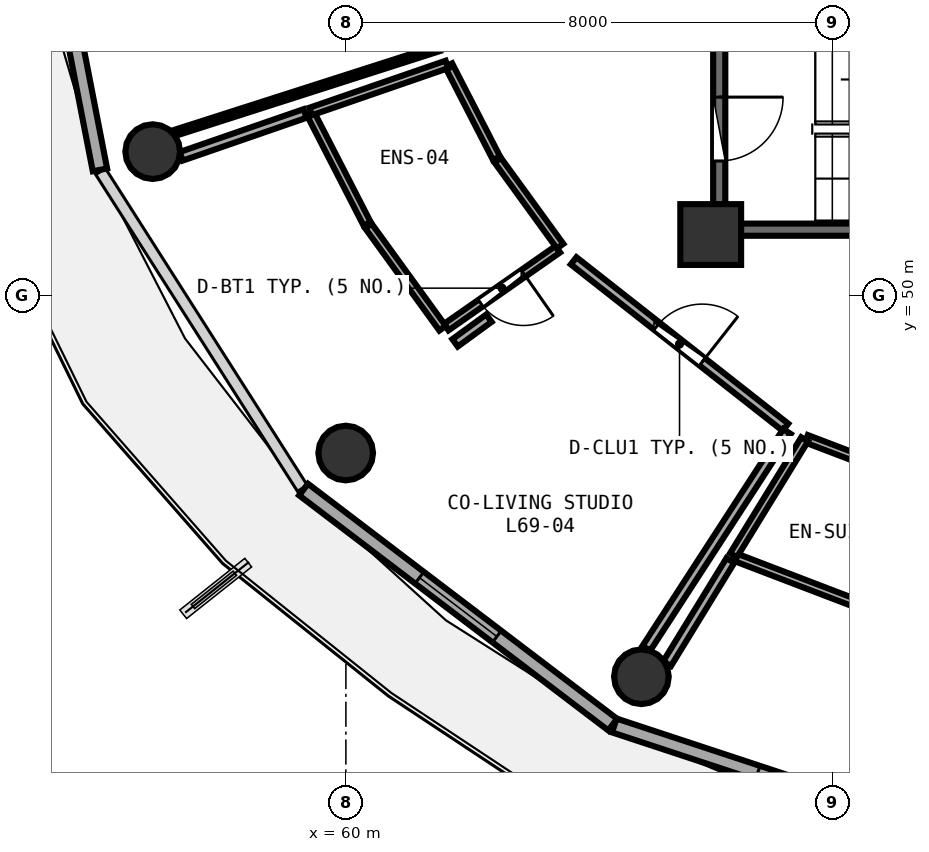
"""IFC4 building model, lengths in metres.
Left out: names, types, materials, properties, quantities, classifications, styles, units other than length and angle.
Written with IfcOpenShell. Run it as: python <this file> out.ifc"""

import sys

from ifc_helpers import new_model, si_unit, direction, frame, frame_2d, origin, origin_2d, place, context, subcontext, project, spatial, rectangle, circle, extrude, element, fill, save


model = new_model("IFC4")
c1 = context("Model", 3, precision=1e-05, world=origin(), true_north=direction((0.0, 1.0)))
c2 = subcontext(c1, "Body", "Model", "MODEL_VIEW")
j1 = project(units=[si_unit("LENGTHUNIT", "METRE"), si_unit("PLANEANGLEUNIT", "RADIAN")], contexts=[c1])
p1 = place(None, origin())
s1 = spatial("IfcSite", under=j1, at=p1, CompositionType="ELEMENT")
p2 = place(p1, origin())
s2 = spatial("IfcBuilding", under=s1, at=p2, CompositionType="ELEMENT")
p3 = place(p2, frame((0.0, 0.0, 271.2)))
s3 = spatial("IfcBuildingStorey", under=s2, at=p3, CompositionType="ELEMENT", Elevation=271.2)
p4 = place(p3, frame((66.0, 51.0, 0.0), z_axis=(0.0, 0.0, 1.0), x_axis=(1.0, 0.0, 0.0)))
e1 = element("IfcColumn", 1, at=p4, inside=s3, PredefinedType="PILASTER", context=c2, shape_type="SweptSolid", body=[
    extrude(rectangle(XDim=1.0, YDim=1.0, at=origin_2d()), origin(), (0.0, 0.0, 1.0), 3.75),
])
for number, where, z_axis, x_axis in (
    (2, (56.823, 52.364, 0.0), (0.0, 0.0, 1.0), (1.0, 0.0, 0.0)),
    (3, (59.997, 47.407, 0.0), (0.0, 0.0, 1.0), (1.0, 0.0, 0.0)),
    (4, (64.86, 43.728, 0.0), (0.0, 0.0, 1.0), (1.0, 0.0, 0.0)),
):
    element("IfcColumn", number, at=place(p3, frame(where, z_axis=z_axis, x_axis=x_axis)), inside=s3, PredefinedType="COLUMN", context=c2, shape_type="SweptSolid", body=[
        extrude(circle(Radius=0.45, at=origin_2d()), origin(), (0.0, 0.0, 1.0), 3.75),
    ])
p5 = place(p3, frame((54.803, 57.985, 0.0), z_axis=(0.0, 0.0, 1.0), x_axis=(0.190969309115, -0.981596008028, 0.0)))
e5 = element("IfcWall", 5, at=p5, inside=s3, PredefinedType="SOLIDWALL", context=c2, shape_type="SweptSolid", body=[
    extrude(rectangle(XDim=6.033, YDim=0.24, at=frame_2d((3.017, 0.0))), origin(), (0.0, 0.0, 1.0), 3.475),
])
p6 = place(p5, frame((2.216, 0.0, 0.85)))
e6 = element("IfcOpeningElement", 6, at=p6, cuts=e5, PredefinedType="OPENING", context=c2, shape_type="SweptSolid", body=[
    extrude(rectangle(XDim=1.6, YDim=1.45, at=frame_2d((0.8, 0.725))), frame((0.0, 0.13, 0.0), z_axis=(0.0, -1.0, 0.0), x_axis=(1.0, 0.0, 0.0)), (0.0, 0.0, 1.0), 0.26),
])
p7 = place(p3, frame((59.304, 46.806, 0.0), z_axis=(0.0, 0.0, 1.0), x_axis=(0.796010444211, -0.605282886514, 0.0)))
e7 = element("IfcWall", 7, at=p7, inside=s3, PredefinedType="SOLIDWALL", context=c2, shape_type="SweptSolid", body=[
    extrude(rectangle(XDim=6.387, YDim=0.24, at=frame_2d((3.194, 0.0))), origin(), (0.0, 0.0, 1.0), 3.475),
])
p8 = place(p7, frame((2.394, 0.0, 0.85)))
e8 = element("IfcOpeningElement", 8, at=p8, cuts=e7, PredefinedType="OPENING", context=c2, shape_type="SweptSolid", body=[
    extrude(rectangle(XDim=1.6, YDim=1.45, at=frame_2d((0.8, 0.725))), frame((0.0, 0.13, 0.0), z_axis=(0.0, -1.0, 0.0), x_axis=(1.0, 0.0, 0.0)), (0.0, 0.0, 1.0), 0.26),
])
p9 = place(p3, frame((64.414, 42.927, 0.0), z_axis=(0.0, 0.0, 1.0), x_axis=(0.949663708393, -0.313271193954, 0.0)))
e9 = element("IfcWall", 9, at=p9, inside=s3, PredefinedType="SOLIDWALL", context=c2, shape_type="SweptSolid", body=[
    extrude(rectangle(XDim=6.568, YDim=0.24, at=frame_2d((3.284, 0.0))), origin(), (0.0, 0.0, 1.0), 3.475),
])
p10 = place(p9, frame((2.484, 0.0, 0.85)))
e10 = element("IfcOpeningElement", 10, at=p10, cuts=e9, PredefinedType="OPENING", context=c2, shape_type="SweptSolid", body=[
    extrude(rectangle(XDim=1.6, YDim=1.45, at=frame_2d((0.8, 0.725))), frame((0.0, 0.13, 0.0), z_axis=(0.0, -1.0, 0.0), x_axis=(1.0, 0.0, 0.0)), (0.0, 0.0, 1.0), 0.26),
])
p11 = place(p3, frame((66.26, 51.08, 0.0), z_axis=(0.0, 0.0, 1.0), x_axis=(1.0, 0.0, 0.0)))
e11 = element("IfcWall", 11, at=p11, inside=s3, PredefinedType="SHEAR", context=c2, shape_type="SweptSolid", body=[
    extrude(rectangle(XDim=7.16, YDim=0.2, at=frame_2d((3.58, 0.0))), origin(), (0.0, 0.0, 1.0), 3.49),
])
p12 = place(p3, frame((66.14, 54.27, 0.0), z_axis=(0.0, 0.0, 1.0), x_axis=(0.0, -1.0, 0.0)))
e12 = element("IfcWall", 12, at=p12, inside=s3, PredefinedType="SHEAR", context=c2, shape_type="SweptSolid", body=[
    extrude(rectangle(XDim=3.07, YDim=0.2, at=frame_2d((1.535, 0.0))), origin(), (0.0, 0.0, 1.0), 3.49),
])
p13 = place(p12, frame((1.01, 0.0, 0.0)))
e13 = element("IfcOpeningElement", 13, at=p13, cuts=e12, PredefinedType="OPENING", context=c2, shape_type="SweptSolid", body=[
    extrude(rectangle(XDim=1.05, YDim=2.1, at=frame_2d((0.525, 1.05))), frame((0.0, 0.11, 0.0), z_axis=(0.0, -1.0, 0.0), x_axis=(1.0, 0.0, 0.0)), (0.0, 0.0, 1.0), 0.22),
])
p14 = place(p3, frame((63.486, 50.759, 0.0), z_axis=(0.0, 0.0, 1.0), x_axis=(-0.819963878171, -0.572415267525, 0.0)))
e14 = element("IfcWall", 14, at=p14, inside=s3, PredefinedType="PLUMBINGWALL", context=c2, shape_type="SweptSolid", body=[
    extrude(rectangle(XDim=2.239, YDim=0.13, at=frame_2d((1.119, 0.0))), origin(), (0.0, 0.0, 1.0), 3.175),
])
p15 = place(p14, frame((0.689, 0.0, 0.0)))
e15 = element("IfcOpeningElement", 15, at=p15, cuts=e14, PredefinedType="OPENING", context=c2, shape_type="SweptSolid", body=[
    extrude(rectangle(XDim=0.86, YDim=2.05, at=frame_2d((0.43, 1.025))), frame((0.0, 0.075, 0.0), z_axis=(0.0, -1.0, 0.0), x_axis=(1.0, 0.0, 0.0)), (0.0, 0.0, 1.0), 0.15),
])
p16 = place(p3, frame((63.745, 50.568, 0.0), z_axis=(0.0, 0.0, 1.0), x_axis=(0.786354671358, -0.617775307724, 0.0)))
e16 = element("IfcWall", 16, at=p16, inside=s3, PredefinedType="PARTITIONING", context=c2, shape_type="SweptSolid", body=[
    extrude(rectangle(XDim=4.43, YDim=0.15, at=frame_2d((2.215, 0.0))), origin(), (0.0, 0.0, 1.0), 3.075),
])
p17 = place(p16, frame((1.74, 0.0, 0.0)))
e17 = element("IfcOpeningElement", 17, at=p17, cuts=e16, PredefinedType="OPENING", context=c2, shape_type="SweptSolid", body=[
    extrude(rectangle(XDim=0.95, YDim=2.08, at=frame_2d((0.475, 1.04))), frame((0.0, 0.085, 0.0), z_axis=(0.0, -1.0, 0.0), x_axis=(1.0, 0.0, 0.0)), (0.0, 0.0, 1.0), 0.17),
])
p18 = place(p3, frame((61.532, 54.065, 0.0), z_axis=(0.0, 0.0, 1.0), x_axis=(-0.95227750557, -0.305233602976, 0.0)))
e18 = element("IfcWall", 18, at=p18, inside=s3, PredefinedType="PARTITIONING", context=c2, shape_type="SweptSolid", body=[
    extrude(rectangle(XDim=4.565, YDim=0.1, at=frame_2d((2.283, 0.0))), origin(), (0.0, 0.0, 1.0), 3.175),
])
p19 = place(p3, frame((61.689, 53.786, 0.0), z_axis=(0.0, 0.0, 1.0), x_axis=(0.457623641393, -0.889145996357, 0.0)))
e19 = element("IfcWall", 19, at=p19, inside=s3, PredefinedType="PLUMBINGWALL", context=c2, shape_type="SweptSolid", body=[
    extrude(rectangle(XDim=1.721, YDim=0.13, at=frame_2d((0.86, 0.0))), origin(), (0.0, 0.0, 1.0), 3.235),
])
p20 = place(p3, frame((62.498, 52.222, 0.0), z_axis=(0.0, 0.0, 1.0), x_axis=(0.587439614451, -0.809268002193, 0.0)))
e20 = element("IfcWall", 20, at=p20, inside=s3, PredefinedType="PLUMBINGWALL", context=c2, shape_type="SweptSolid", body=[
    extrude(rectangle(XDim=1.746, YDim=0.13, at=frame_2d((0.873, 0.0))), origin(), (0.0, 0.0, 1.0), 3.075),
])
p21 = place(p3, frame((61.589, 49.459, 0.0), z_axis=(0.0, 0.0, 1.0), x_axis=(-0.586913668513, 0.809649520294, 0.0)))
e21 = element("IfcWall", 21, at=p21, inside=s3, PredefinedType="PLUMBINGWALL", context=c2, shape_type="SweptSolid", body=[
    extrude(rectangle(XDim=2.078, YDim=0.13, at=frame_2d((1.039, 0.0))), origin(), (0.0, 0.0, 1.0), 3.48),
])
p22 = place(p3, frame((60.349, 51.176, 0.0), z_axis=(0.0, 0.0, 1.0), x_axis=(-0.456758857188, 0.889590549849, 0.0)))
e22 = element("IfcWall", 22, at=p22, inside=s3, PredefinedType="PLUMBINGWALL", context=c2, shape_type="SweptSolid", body=[
    extrude(rectangle(XDim=2.051, YDim=0.13, at=frame_2d((1.025, 0.0))), origin(), (0.0, 0.0, 1.0), 3.075),
])
p23 = place(p3, frame((59.422, 53.024, 0.0), z_axis=(0.0, 0.0, 1.0), x_axis=(0.945238193125, 0.326381308071, 0.0)))
e23 = element("IfcWall", 23, at=p23, inside=s3, PredefinedType="PLUMBINGWALL", context=c2, shape_type="SweptSolid", body=[
    extrude(rectangle(XDim=2.369, YDim=0.13, at=frame_2d((1.185, 0.0))), origin(), (0.0, 0.0, 1.0), 3.175),
])
p24 = place(p3, frame((67.254, 47.76, 0.0), z_axis=(0.0, 0.0, 1.0), x_axis=(-0.544234825024, -0.838932926539, 0.0)))
e24 = element("IfcWall", 24, at=p24, inside=s3, PredefinedType="PARTITIONING", context=c2, shape_type="SweptSolid", body=[
    extrude(rectangle(XDim=4.249, YDim=0.15, at=frame_2d((2.125, 0.0))), origin(), (0.0, 0.0, 1.0), 3.075),
])
p25 = place(p3, frame((57.291, 52.287, 0.0), z_axis=(0.0, 0.0, 1.0), x_axis=(0.945101825102, 0.326775978598, 0.0)))
e25 = element("IfcWall", 25, at=p25, inside=s3, PredefinedType="PARTITIONING", context=c2, shape_type="SweptSolid", body=[
    extrude(rectangle(XDim=2.156, YDim=0.15, at=frame_2d((1.078, 0.0))), origin(), (0.0, 0.0, 1.0), 3.075),
])
p26 = place(p3, frame((61.795, 49.219, 0.0), z_axis=(0.0, 0.0, 1.0), x_axis=(0.808091885227, 0.589056453178, 0.0)))
e26 = element("IfcWall", 26, at=p26, inside=s3, PredefinedType="PARTITIONING", context=c2, shape_type="SweptSolid", body=[
    extrude(rectangle(XDim=0.689, YDim=0.15, at=frame_2d((0.344, 0.0))), origin(), (0.0, 0.0, 1.0), 3.175),
])
p27 = place(p3, frame((67.574, 47.642, 0.0), z_axis=(0.0, 0.0, 1.0), x_axis=(0.934318832382, -0.35643838101, 0.0)))
e27 = element("IfcWall", 27, at=p27, inside=s3, PredefinedType="PLUMBINGWALL", context=c2, shape_type="SweptSolid", body=[
    extrude(rectangle(XDim=2.841, YDim=0.13, at=frame_2d((1.42, 0.0))), origin(), (0.0, 0.0, 1.0), 3.48),
])
p28 = place(p3, frame((69.534, 44.497, 0.0), z_axis=(0.0, 0.0, 1.0), x_axis=(-0.934061774164, 0.357111470057, 0.0)))
e28 = element("IfcWall", 28, at=p28, inside=s3, PredefinedType="PLUMBINGWALL", context=c2, shape_type="SweptSolid", body=[
    extrude(rectangle(XDim=3.374, YDim=0.13, at=frame_2d((1.687, 0.0))), origin(), (0.0, 0.0, 1.0), 3.48),
])
p29 = place(p3, frame((66.375, 45.726, 0.0), z_axis=(0.0, 0.0, 1.0), x_axis=(0.523122555159, 0.852257468306, 0.0)))
e29 = element("IfcWall", 29, at=p29, inside=s3, PredefinedType="PLUMBINGWALL", context=c2, shape_type="SweptSolid", body=[
    extrude(rectangle(XDim=2.236, YDim=0.13, at=frame_2d((1.118, 0.0))), origin(), (0.0, 0.0, 1.0), 3.175),
])
p30 = place(p3, frame((65.283, 43.944, 0.0), z_axis=(0.0, 0.0, 1.0), x_axis=(0.522809528722, 0.852449527349, 0.0)))
e30 = element("IfcWall", 30, at=p30, inside=s3, PredefinedType="PARTITIONING", context=c2, shape_type="SweptSolid", body=[
    extrude(rectangle(XDim=1.989, YDim=0.15, at=frame_2d((0.995, 0.0))), origin(), (0.0, 0.0, 1.0), 3.235),
])
p31 = place(p8, origin())
e31 = element("IfcWindow", 31, at=p31, inside=s3, PartitioningType="SINGLE_PANEL", PredefinedType="WINDOW", context=c2, shape_type="SweptSolid", body=[
    extrude(rectangle(XDim=1.6, YDim=1.45, at=frame_2d((0.8, 0.725))), frame((0.0, 0.03, 0.0), z_axis=(0.0, -1.0, 0.0), x_axis=(1.0, 0.0, 0.0)), (0.0, 0.0, 1.0), 0.06),
])
fill(e8, e31)
p32 = place(p10, origin())
e32 = element("IfcWindow", 32, at=p32, inside=s3, PartitioningType="SINGLE_PANEL", PredefinedType="WINDOW", context=c2, shape_type="SweptSolid", body=[
    extrude(rectangle(XDim=1.6, YDim=1.45, at=frame_2d((0.8, 0.725))), frame((0.0, 0.03, 0.0), z_axis=(0.0, -1.0, 0.0), x_axis=(1.0, 0.0, 0.0)), (0.0, 0.0, 1.0), 0.06),
])
fill(e10, e32)
p33 = place(p13, origin())
e33 = element("IfcDoor", 33, at=p33, inside=s3, OperationType="SINGLE_SWING_LEFT", PredefinedType="DOOR", context=c2, shape_type="SweptSolid", body=[
    extrude(rectangle(XDim=1.05, YDim=2.1, at=frame_2d((0.525, 1.05))), frame((0.0, 0.025, 0.0), z_axis=(0.0, -1.0, 0.0), x_axis=(1.0, 0.0, 0.0)), (0.0, 0.0, 1.0), 0.05),
])
fill(e13, e33)
p34 = place(p15, origin())
e34 = element("IfcDoor", 34, at=p34, inside=s3, OperationType="SINGLE_SWING_LEFT", PredefinedType="DOOR", context=c2, shape_type="SweptSolid", body=[
    extrude(rectangle(XDim=0.86, YDim=2.05, at=frame_2d((0.43, 1.025))), frame((0.0, 0.025, 0.0), z_axis=(0.0, -1.0, 0.0), x_axis=(1.0, 0.0, 0.0)), (0.0, 0.0, 1.0), 0.05),
])
fill(e15, e34)
p35 = place(p17, origin())
e35 = element("IfcDoor", 35, at=p35, inside=s3, OperationType="SINGLE_SWING_RIGHT", PredefinedType="DOOR", context=c2, shape_type="SweptSolid", body=[
    extrude(rectangle(XDim=0.95, YDim=2.08, at=frame_2d((0.475, 1.04))), frame((0.0, 0.025, 0.0), z_axis=(0.0, -1.0, 0.0), x_axis=(1.0, 0.0, 0.0)), (0.0, 0.0, 1.0), 0.05),
])
fill(e17, e35)
save(model, sys.argv[1])
